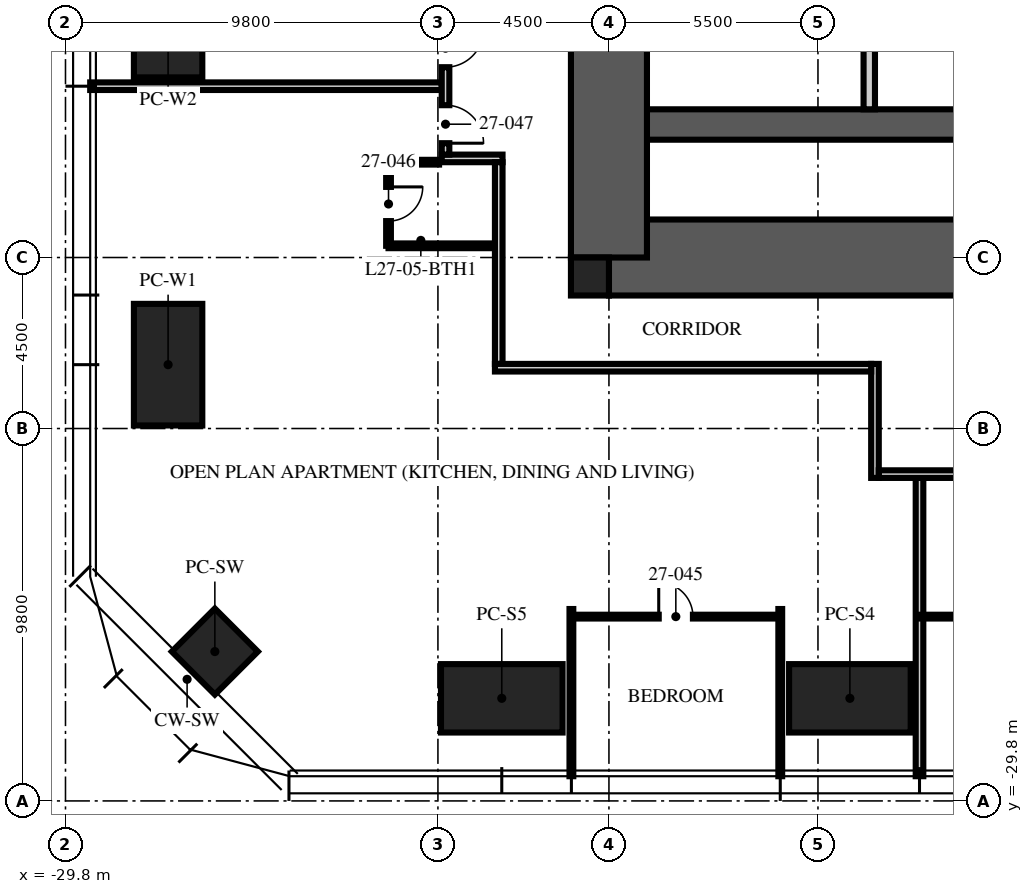
"""IFC4 building model, lengths in metres.
Left out: names, types, materials, properties, quantities, classifications, styles, units other than length and angle.
Written with IfcOpenShell. Run it as: python <this file> out.ifc"""

import sys

from ifc_helpers import new_model, si_unit, direction, frame, frame_2d, origin, origin_2d, place, context, subcontext, project, spatial, rectangle, hollow_rectangle, extrude, element, fill, save


model = new_model("IFC4")
c1 = context("Model", 3, precision=1e-05, world=origin(), true_north=direction((0.0, 1.0)))
c2 = subcontext(c1, "Body", "Model", "MODEL_VIEW")
j1 = project(units=[si_unit("LENGTHUNIT", "METRE"), si_unit("PLANEANGLEUNIT", "RADIAN")], contexts=[c1])
p1 = place(None, origin())
s1 = spatial("IfcSite", under=j1, at=p1, CompositionType="ELEMENT")
p2 = place(p1, origin())
s2 = spatial("IfcBuilding", under=s1, at=p2, CompositionType="ELEMENT")
p3 = place(p2, frame((0.0, 0.0, 111.0)))
s3 = spatial("IfcBuildingStorey", under=s2, at=p3, CompositionType="ELEMENT", Elevation=111.0)
p4 = place(p3, frame((-15.5, -15.5, -0.25), z_axis=(0.0, 0.0, 1.0), x_axis=(1.0, 0.0, 0.0)))
e1 = element("IfcWall", 1, at=p4, inside=s3, PredefinedType="SHEAR", context=c2, shape_type="SweptSolid", body=[
    extrude(rectangle(XDim=31.0, YDim=2.0, at=frame_2d((15.5, 0.0))), origin(), (0.0, 0.0, 1.0), 3.75),
])
p5 = place(p4, frame((10.4, 0.0, 0.25)))
e2 = element("IfcOpeningElement", 2, at=p5, cuts=e1, PredefinedType="OPENING", context=c2, shape_type="SweptSolid", body=[
    extrude(rectangle(XDim=1.1, YDim=2.1, at=frame_2d((0.55, 1.05))), frame((0.0, 1.01, 0.0), z_axis=(0.0, -1.0, 0.0), x_axis=(1.0, 0.0, 0.0)), (0.0, 0.0, 1.0), 2.02),
])
p6 = place(p4, frame((13.5, 0.0, 0.25)))
e3 = element("IfcOpeningElement", 3, at=p6, cuts=e1, PredefinedType="OPENING", context=c2, shape_type="SweptSolid", body=[
    extrude(rectangle(XDim=1.1, YDim=2.1, at=frame_2d((0.55, 1.05))), frame((0.0, 1.01, 0.0), z_axis=(0.0, -1.0, 0.0), x_axis=(1.0, 0.0, 0.0)), (0.0, 0.0, 1.0), 2.02),
])
p7 = place(p4, frame((16.6, 0.0, 0.25)))
e4 = element("IfcOpeningElement", 4, at=p7, cuts=e1, PredefinedType="OPENING", context=c2, shape_type="SweptSolid", body=[
    extrude(rectangle(XDim=1.1, YDim=2.1, at=frame_2d((0.55, 1.05))), frame((0.0, 1.01, 0.0), z_axis=(0.0, -1.0, 0.0), x_axis=(1.0, 0.0, 0.0)), (0.0, 0.0, 1.0), 2.02),
])
p8 = place(p3, frame((-15.5, -12.0, -0.25), z_axis=(0.0, 0.0, 1.0), x_axis=(1.0, 0.0, 0.0)))
e5 = element("IfcWall", 5, at=p8, inside=s3, PredefinedType="SHEAR", context=c2, shape_type="SweptSolid", body=[
    extrude(rectangle(XDim=31.0, YDim=0.8, at=frame_2d((15.5, 0.0))), origin(), (0.0, 0.0, 1.0), 3.75),
])
p9 = place(p3, frame((-15.5, -15.5, -0.25), z_axis=(0.0, 0.0, 1.0), x_axis=(0.0, 1.0, 0.0)))
e6 = element("IfcWall", 6, at=p9, inside=s3, PredefinedType="SHEAR", context=c2, shape_type="SweptSolid", body=[
    extrude(rectangle(XDim=31.0, YDim=2.0, at=frame_2d((15.5, 0.0))), origin(), (0.0, 0.0, 1.0), 3.75),
])
p10 = place(p9, frame((6.5, 0.0, 0.25)))
e7 = element("IfcOpeningElement", 7, at=p10, cuts=e6, PredefinedType="OPENING", context=c2, shape_type="SweptSolid", body=[
    extrude(rectangle(XDim=1.2, YDim=2.1, at=frame_2d((0.6, 1.05))), frame((0.0, 1.01, 0.0), z_axis=(0.0, -1.0, 0.0), x_axis=(1.0, 0.0, 0.0)), (0.0, 0.0, 1.0), 2.02),
])
p11 = place(p9, frame((23.0, 0.0, 0.25)))
e8 = element("IfcOpeningElement", 8, at=p11, cuts=e6, PredefinedType="OPENING", context=c2, shape_type="SweptSolid", body=[
    extrude(rectangle(XDim=1.8, YDim=2.1, at=frame_2d((0.9, 1.05))), frame((0.0, 1.01, 0.0), z_axis=(0.0, -1.0, 0.0), x_axis=(1.0, 0.0, 0.0)), (0.0, 0.0, 1.0), 2.02),
])
p12 = place(p3, frame((-16.0, -16.0, -0.25), z_axis=(0.0, 0.0, 1.0), x_axis=(1.0, 0.0, 0.0)))
e9 = element("IfcColumn", 9, at=p12, inside=s3, PredefinedType="COLUMN", context=c2, shape_type="SweptSolid", body=[
    extrude(rectangle(XDim=1.0, YDim=1.0, at=origin_2d()), origin(), (0.0, 0.0, 1.0), 3.75),
])
for number, where, z_axis, x_axis in (
    (10, (-9.16, -27.1, 0.0), (0.0, 0.0, 1.0), (1.0, 0.0, 0.0)),
    (11, (-18.32, -27.1, 0.0), (0.0, 0.0, 1.0), (1.0, 0.0, 0.0)),
    (12, (-27.1, -18.32, 0.0), (0.0, 0.0, 1.0), (0.0, 1.0, 0.0)),
    (13, (-27.1, -9.16, 0.0), (0.0, 0.0, 1.0), (0.0, 1.0, 0.0)),
):
    element("IfcColumn", number, at=place(p3, frame(where, z_axis=z_axis, x_axis=x_axis)), inside=s3, PredefinedType="COLUMN", context=c2, shape_type="SweptSolid", body=[
        extrude(hollow_rectangle(XDim=3.2, YDim=1.8, WallThickness=0.2, at=origin_2d()), origin(), (0.0, 0.0, 1.0), 3.75),
    ])
p13 = place(p3, frame((-25.87, -25.87, 0.0), z_axis=(0.0, 0.0, 1.0), x_axis=(0.707106781187, -0.707106781187, 0.0)))
e14 = element("IfcColumn", 14, at=p13, inside=s3, PredefinedType="COLUMN", context=c2, shape_type="SweptSolid", body=[
    extrude(hollow_rectangle(XDim=1.6, YDim=1.6, WallThickness=0.1, at=origin_2d()), origin(), (0.0, 0.0, 1.0), 3.75),
])
p14 = place(p3, frame((-8.65, -11.6, 0.0), z_axis=(0.0, 0.0, 1.0), x_axis=(0.0, 1.0, 0.0)))
e15 = element("IfcWall", 15, at=p14, inside=s3, PredefinedType="PARTITIONING", context=c2, shape_type="SweptSolid", body=[
    extrude(rectangle(XDim=6.7, YDim=0.3, at=frame_2d((3.35, 0.0))), origin(), (0.0, 0.0, 1.0), 3.5),
])
p15 = place(p14, frame((2.85, 0.0, 0.0)))
e16 = element("IfcOpeningElement", 16, at=p15, cuts=e15, PredefinedType="OPENING", context=c2, shape_type="SweptSolid", body=[
    extrude(rectangle(XDim=1.1, YDim=2.1, at=frame_2d((0.55, 1.05))), frame((0.0, 0.16, 0.0), z_axis=(0.0, -1.0, 0.0), x_axis=(1.0, 0.0, 0.0)), (0.0, 0.0, 1.0), 0.32),
])
p16 = place(p3, frame((-19.9, -10.992, 0.0), z_axis=(0.0, 0.0, 1.0), x_axis=(-1.0, 0.0, 0.0)))
e17 = element("IfcWall", 17, at=p16, inside=s3, PredefinedType="PARTITIONING", context=c2, shape_type="SweptSolid", body=[
    extrude(rectangle(XDim=9.25, YDim=0.2, at=frame_2d((4.625, 0.0))), origin(), (0.0, 0.0, 1.0), 2.81),
])
for number, where, z_axis, x_axis in (
    (18, (-16.488, -24.75, 0.0), (0.0, 0.0, 1.0), (0.0, -1.0, 0.0)),
    (19, (-10.992, -24.75, 0.0), (0.0, 0.0, 1.0), (0.0, -1.0, 0.0)),
):
    element("IfcWall", number, at=place(p3, frame(where, z_axis=z_axis, x_axis=x_axis)), inside=s3, PredefinedType="PARTITIONING", context=c2, shape_type="SweptSolid", body=[
        extrude(rectangle(XDim=4.4, YDim=0.1, at=frame_2d((2.2, 0.0))), origin(), (0.0, 0.0, 1.0), 2.81),
    ])
p17 = place(p3, frame((-7.328, -21.3, 0.0), z_axis=(0.0, 0.0, 1.0), x_axis=(0.0, -1.0, 0.0)))
e20 = element("IfcWall", 20, at=p17, inside=s3, PredefinedType="PARTITIONING", context=c2, shape_type="SweptSolid", body=[
    extrude(rectangle(XDim=7.85, YDim=0.2, at=frame_2d((3.925, 0.0))), origin(), (0.0, 0.0, 1.0), 2.81),
])
p18 = place(p3, frame((-16.488, -24.95, 0.0), z_axis=(0.0, 0.0, 1.0), x_axis=(1.0, 0.0, 0.0)))
e21 = element("IfcWall", 21, at=p18, inside=s3, PredefinedType="PARTITIONING", context=c2, shape_type="SweptSolid", body=[
    extrude(rectangle(XDim=5.496, YDim=0.1, at=frame_2d((2.748, 0.0))), origin(), (0.0, 0.0, 1.0), 2.81),
])
p19 = place(p18, frame((2.298, 0.0, 0.0)))
e22 = element("IfcOpeningElement", 22, at=p19, cuts=e21, PredefinedType="OPENING", context=c2, shape_type="SweptSolid", body=[
    extrude(rectangle(XDim=0.9, YDim=2.1, at=frame_2d((0.45, 1.05))), frame((0.0, 0.06, 0.0), z_axis=(0.0, -1.0, 0.0), x_axis=(1.0, 0.0, 0.0)), (0.0, 0.0, 1.0), 0.12),
])
p20 = place(p3, frame((-21.3, -12.992, 0.0), z_axis=(0.0, 0.0, 1.0), x_axis=(0.0, -1.0, 0.0)))
e23 = element("IfcWall", 23, at=p20, inside=s3, PredefinedType="PARTITIONING", context=c2, shape_type="SweptSolid", body=[
    extrude(rectangle(XDim=2.2, YDim=0.125, at=frame_2d((1.1, 0.0))), origin(), (0.0, 0.0, 1.0), 2.81),
])
p21 = place(p20, frame((0.65, 0.0, 0.0)))
e24 = element("IfcOpeningElement", 24, at=p21, cuts=e23, PredefinedType="OPENING", context=c2, shape_type="SweptSolid", body=[
    extrude(rectangle(XDim=0.9, YDim=2.1, at=frame_2d((0.45, 1.05))), frame((0.0, 0.073, 0.0), z_axis=(0.0, -1.0, 0.0), x_axis=(1.0, 0.0, 0.0)), (0.0, 0.0, 1.0), 0.145),
])
p22 = place(p3, frame((-19.97, -12.992, 0.0), z_axis=(0.0, 0.0, 1.0), x_axis=(-1.0, 0.0, 0.0)))
e25 = element("IfcWall", 25, at=p22, inside=s3, PredefinedType="PARTITIONING", context=c2, shape_type="SweptSolid", body=[
    extrude(rectangle(XDim=1.33, YDim=0.125, at=frame_2d((0.665, 0.0))), origin(), (0.0, 0.0, 1.0), 3.5),
])
p23 = place(p3, frame((-18.5, -15.192, 0.0), z_axis=(0.0, 0.0, 1.0), x_axis=(-1.0, 0.0, 0.0)))
e26 = element("IfcWall", 26, at=p23, inside=s3, PredefinedType="PARTITIONING", context=c2, shape_type="SweptSolid", body=[
    extrude(rectangle(XDim=2.8, YDim=0.125, at=frame_2d((1.4, 0.0))), origin(), (0.0, 0.0, 1.0), 3.5),
])
p24 = place(p3, frame((-7.328, -24.95, 0.0), z_axis=(0.0, 0.0, 1.0), x_axis=(1.0, 0.0, 0.0)))
e27 = element("IfcWall", 27, at=p24, inside=s3, PredefinedType="PARTITIONING", context=c2, shape_type="SweptSolid", body=[
    extrude(rectangle(XDim=5.496, YDim=0.1, at=frame_2d((2.748, 0.0))), origin(), (0.0, 0.0, 1.0), 2.81),
])
p25 = place(p24, frame((2.298, 0.0, 0.0)))
e28 = element("IfcOpeningElement", 28, at=p25, cuts=e27, PredefinedType="OPENING", context=c2, shape_type="SweptSolid", body=[
    extrude(rectangle(XDim=0.9, YDim=2.1, at=frame_2d((0.45, 1.05))), frame((0.0, 0.06, 0.0), z_axis=(0.0, -1.0, 0.0), x_axis=(1.0, 0.0, 0.0)), (0.0, 0.0, 1.0), 0.12),
])
p26 = place(p3, frame((-18.3, -12.892, 0.0), z_axis=(0.0, 0.0, 1.0), x_axis=(-1.0, 0.0, 0.0)))
e29 = element("IfcWall", 29, at=p26, inside=s3, PredefinedType="PARTITIONING", context=c2, shape_type="SweptSolid", body=[
    extrude(rectangle(XDim=1.6, YDim=0.2, at=frame_2d((0.8, 0.0))), origin(), (0.0, 0.0, 1.0), 3.5),
])
p27 = place(p3, frame((-19.8, -9.192, 0.0), z_axis=(0.0, 0.0, 1.0), x_axis=(0.0, -1.0, 0.0)))
e30 = element("IfcWall", 30, at=p27, inside=s3, PredefinedType="PARTITIONING", context=c2, shape_type="SweptSolid", body=[
    extrude(rectangle(XDim=3.6, YDim=0.2, at=frame_2d((1.8, 0.0))), origin(), (0.0, 0.0, 1.0), 2.7),
])
p28 = place(p27, frame((0.3, 0.0, 0.0)))
e31 = element("IfcOpeningElement", 31, at=p28, cuts=e30, PredefinedType="OPENING", context=c2, shape_type="SweptSolid", body=[
    extrude(rectangle(XDim=1.0, YDim=2.2, at=frame_2d((0.5, 1.1))), frame((0.0, 0.11, 0.0), z_axis=(0.0, -1.0, 0.0), x_axis=(1.0, 0.0, 0.0)), (0.0, 0.0, 1.0), 0.22),
])
p29 = place(p27, frame((2.3, 0.0, 0.0)))
e32 = element("IfcOpeningElement", 32, at=p29, cuts=e30, PredefinedType="OPENING", context=c2, shape_type="SweptSolid", body=[
    extrude(rectangle(XDim=1.0, YDim=2.2, at=frame_2d((0.5, 1.1))), frame((0.0, 0.11, 0.0), z_axis=(0.0, -1.0, 0.0), x_axis=(1.0, 0.0, 0.0)), (0.0, 0.0, 1.0), 0.22),
])
p30 = place(p3, frame((-18.4, -12.992, 0.0), z_axis=(0.0, 0.0, 1.0), x_axis=(0.0, -1.0, 0.0)))
e33 = element("IfcWall", 33, at=p30, inside=s3, PredefinedType="PARTITIONING", context=c2, shape_type="SweptSolid", body=[
    extrude(rectangle(XDim=5.308, YDim=0.2, at=frame_2d((2.654, 0.0))), origin(), (0.0, 0.0, 1.0), 2.3),
])
p31 = place(p3, frame((-8.5, -18.3, 0.0), z_axis=(0.0, 0.0, 1.0), x_axis=(0.0, -1.0, 0.0)))
e34 = element("IfcWall", 34, at=p31, inside=s3, PredefinedType="PARTITIONING", context=c2, shape_type="SweptSolid", body=[
    extrude(rectangle(XDim=3.0, YDim=0.2, at=frame_2d((1.5, 0.0))), origin(), (0.0, 0.0, 1.0), 3.5),
])
p32 = place(p3, frame((5.4, -21.2, 0.0), z_axis=(0.0, 0.0, 1.0), x_axis=(-1.0, 0.0, 0.0)))
e35 = element("IfcWall", 35, at=p32, inside=s3, PredefinedType="PARTITIONING", context=c2, shape_type="SweptSolid", body=[
    extrude(rectangle(XDim=13.8, YDim=0.2, at=frame_2d((6.9, 0.0))), origin(), (0.0, 0.0, 1.0), 2.7),
])
p33 = place(p3, frame((-8.6, -18.4, 0.0), z_axis=(0.0, 0.0, 1.0), x_axis=(-1.0, 0.0, 0.0)))
e36 = element("IfcWall", 36, at=p33, inside=s3, PredefinedType="PARTITIONING", context=c2, shape_type="SweptSolid", body=[
    extrude(rectangle(XDim=9.9, YDim=0.2, at=frame_2d((4.95, 0.0))), origin(), (0.0, 0.0, 1.0), 2.3),
])
p34 = place(p28, origin())
e37 = element("IfcDoor", 37, at=p34, inside=s3, OperationType="SINGLE_SWING_LEFT", PredefinedType="DOOR", context=c2, shape_type="SweptSolid", body=[
    extrude(rectangle(XDim=1.0, YDim=2.2, at=frame_2d((0.5, 1.1))), frame((0.0, 0.025, 0.0), z_axis=(0.0, -1.0, 0.0), x_axis=(1.0, 0.0, 0.0)), (0.0, 0.0, 1.0), 0.05),
])
fill(e31, e37)
p35 = place(p19, origin())
e38 = element("IfcDoor", 38, at=p35, inside=s3, OperationType="SINGLE_SWING_LEFT", PredefinedType="DOOR", context=c2, shape_type="SweptSolid", body=[
    extrude(rectangle(XDim=0.9, YDim=2.1, at=frame_2d((0.45, 1.05))), frame((0.0, 0.025, 0.0), z_axis=(0.0, -1.0, 0.0), x_axis=(1.0, 0.0, 0.0)), (0.0, 0.0, 1.0), 0.05),
])
fill(e22, e38)
p36 = place(p21, origin())
e39 = element("IfcDoor", 39, at=p36, inside=s3, OperationType="SINGLE_SWING_LEFT", PredefinedType="DOOR", context=c2, shape_type="SweptSolid", body=[
    extrude(rectangle(XDim=0.9, YDim=2.1, at=frame_2d((0.45, 1.05))), frame((0.0, 0.025, 0.0), z_axis=(0.0, -1.0, 0.0), x_axis=(1.0, 0.0, 0.0)), (0.0, 0.0, 1.0), 0.05),
])
fill(e24, e39)
p37 = place(p29, origin())
e40 = element("IfcDoor", 40, at=p37, inside=s3, OperationType="SINGLE_SWING_RIGHT", PredefinedType="DOOR", context=c2, shape_type="SweptSolid", body=[
    extrude(rectangle(XDim=1.0, YDim=2.2, at=frame_2d((0.5, 1.1))), frame((0.0, 0.025, 0.0), z_axis=(0.0, -1.0, 0.0), x_axis=(1.0, 0.0, 0.0)), (0.0, 0.0, 1.0), 0.05),
])
fill(e32, e40)
save(model, sys.argv[1])
